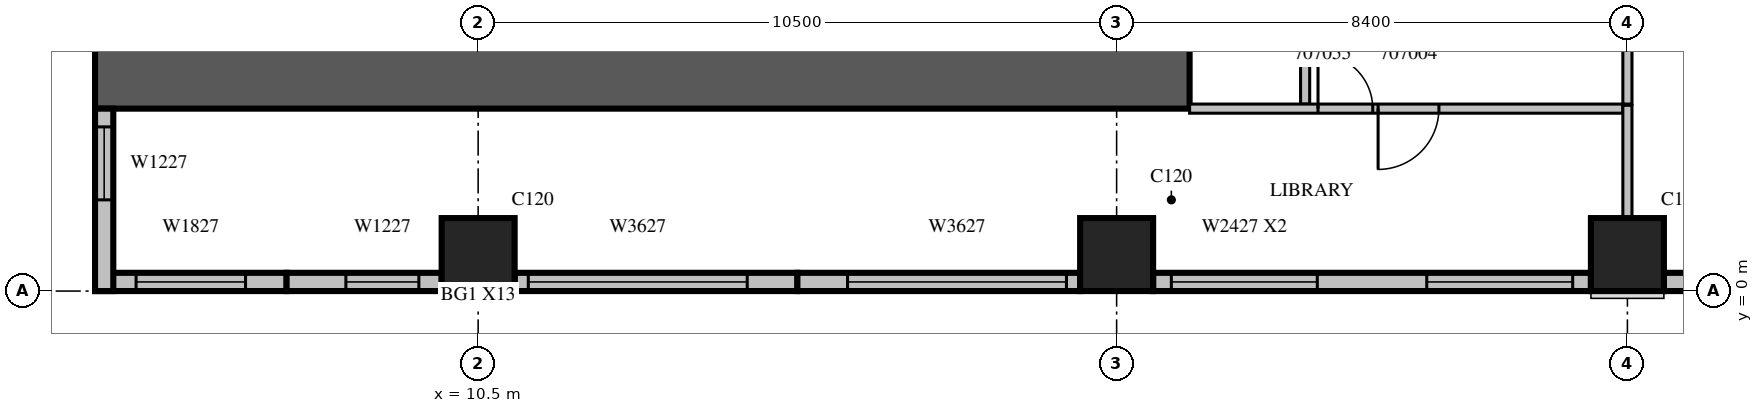
"""IFC4 building model, lengths in metres.
Left out: names, types, materials, properties, quantities, classifications, styles, units other than length and angle.
Written with IfcOpenShell. Run it as: python <this file> out.ifc"""

import sys

from ifc_helpers import new_model, si_unit, direction, frame, frame_2d, origin, origin_2d, place, context, subcontext, project, spatial, rectangle, extrude, source, transform, mapped, element, fill, save


model = new_model("IFC4")
c1 = context("Model", 3, precision=1e-05, world=origin(), true_north=direction((0.0, 1.0)))
c2 = subcontext(c1, "Body", "Model", "MODEL_VIEW")
j1 = project(units=[si_unit("LENGTHUNIT", "METRE"), si_unit("PLANEANGLEUNIT", "RADIAN")], contexts=[c1])
p1 = place(None, origin())
s1 = spatial("IfcSite", under=j1, at=p1, CompositionType="ELEMENT")
p2 = place(p1, origin())
s2 = spatial("IfcBuilding", under=s1, at=p2, CompositionType="ELEMENT")
p3 = place(p2, frame((0.0, 0.0, 40.5)))
s3 = spatial("IfcBuildingStorey", under=s2, at=p3, CompositionType="ELEMENT", Elevation=40.5)
p4 = place(p3, frame((10.5, 0.6, 0.0), z_axis=(0.0, 0.0, 1.0), x_axis=(1.0, 0.0, 0.0)))
e1 = element("IfcColumn", 1, at=p4, inside=s3, PredefinedType="COLUMN", context=c2, shape_type="SweptSolid", body=[
    extrude(rectangle(XDim=1.2, YDim=1.2, at=origin_2d()), origin(), (0.0, 0.0, 1.0), 4.2),
])
m1 = source(origin(), c2, "Body", "SweptSolid", [
    extrude(rectangle(XDim=1.2, YDim=1.2, at=origin_2d()), origin(), (0.0, 0.0, 1.0), 4.2),
])
for number, where, z_axis, x_axis in (
    (2, (21.0, 0.6, 0.0), (0.0, 0.0, 1.0), (1.0, 0.0, 0.0)),
    (3, (29.4, 0.6, 0.0), (0.0, 0.0, 1.0), (1.0, 0.0, 0.0)),
):
    element("IfcColumn", number, at=place(p3, frame(where, z_axis=z_axis, x_axis=x_axis)), inside=s3, PredefinedType="COLUMN", context=c2, shape_type="MappedRepresentation", body=[
        mapped(m1, transform((0.0, 0.0, 0.0), scale=1.0)),
    ])
m2 = source(origin(), c2, "Body", "SweptSolid", [
    extrude(rectangle(XDim=18.0, YDim=1.2, at=frame_2d((9.0, 0.0))), origin(), (0.0, 0.0, 1.0), 4.2),
])
p5 = place(p3, frame((4.2, 3.6, 0.0), z_axis=(0.0, 0.0, 1.0), x_axis=(1.0, 0.0, 0.0)))
e4 = element("IfcWall", 4, at=p5, inside=s3, PredefinedType="SHEAR", context=c2, shape_type="MappedRepresentation", body=[
    mapped(m2, transform((0.0, 0.0, 0.0), scale=1.0)),
])
p6 = place(p3, frame((4.2, 0.15, 0.0), z_axis=(0.0, 0.0, 1.0), x_axis=(1.0, 0.0, 0.0)))
e5 = element("IfcWall", 5, at=p6, inside=s3, PredefinedType="STANDARD", context=c2, shape_type="SweptSolid", body=[
    extrude(rectangle(XDim=3.15, YDim=0.3, at=frame_2d((1.575, 0.0))), origin(), (0.0, 0.0, 1.0), 3.8),
])
p7 = place(p6, frame((0.675, 0.0, 0.6)))
e6 = element("IfcOpeningElement", 6, at=p7, cuts=e5, PredefinedType="OPENING", context=c2, shape_type="SweptSolid", body=[
    extrude(rectangle(XDim=1.8, YDim=2.7, at=frame_2d((0.9, 1.35))), frame((0.0, 0.16, 0.0), z_axis=(0.0, -1.0, 0.0), x_axis=(1.0, 0.0, 0.0)), (0.0, 0.0, 1.0), 0.32),
])
p8 = place(p3, frame((7.35, 0.15, 0.0), z_axis=(0.0, 0.0, 1.0), x_axis=(1.0, 0.0, 0.0)))
e7 = element("IfcWall", 7, at=p8, inside=s3, PredefinedType="STANDARD", context=c2, shape_type="SweptSolid", body=[
    extrude(rectangle(XDim=2.55, YDim=0.3, at=frame_2d((1.275, 0.0))), origin(), (0.0, 0.0, 1.0), 3.8),
])
p9 = place(p8, frame((0.975, 0.0, 0.6)))
e8 = element("IfcOpeningElement", 8, at=p9, cuts=e7, PredefinedType="OPENING", context=c2, shape_type="SweptSolid", body=[
    extrude(rectangle(XDim=1.2, YDim=2.7, at=frame_2d((0.6, 1.35))), frame((0.0, 0.16, 0.0), z_axis=(0.0, -1.0, 0.0), x_axis=(1.0, 0.0, 0.0)), (0.0, 0.0, 1.0), 0.32),
])
p10 = place(p3, frame((11.1, 0.15, 0.0), z_axis=(0.0, 0.0, 1.0), x_axis=(1.0, 0.0, 0.0)))
e9 = element("IfcWall", 9, at=p10, inside=s3, PredefinedType="STANDARD", context=c2, shape_type="SweptSolid", body=[
    extrude(rectangle(XDim=4.65, YDim=0.3, at=frame_2d((2.325, 0.0))), origin(), (0.0, 0.0, 1.0), 3.8),
])
p11 = place(p10, frame((0.225, 0.0, 0.6)))
e10 = element("IfcOpeningElement", 10, at=p11, cuts=e9, PredefinedType="OPENING", context=c2, shape_type="SweptSolid", body=[
    extrude(rectangle(XDim=3.6, YDim=2.7, at=frame_2d((1.8, 1.35))), frame((0.0, 0.16, 0.0), z_axis=(0.0, -1.0, 0.0), x_axis=(1.0, 0.0, 0.0)), (0.0, 0.0, 1.0), 0.32),
])
m3 = source(origin(), c2, "Body", "SweptSolid", [
    extrude(rectangle(XDim=4.65, YDim=0.3, at=frame_2d((2.325, 0.0))), origin(), (0.0, 0.0, 1.0), 3.8),
])
p12 = place(p3, frame((15.75, 0.15, 0.0), z_axis=(0.0, 0.0, 1.0), x_axis=(1.0, 0.0, 0.0)))
e11 = element("IfcWall", 11, at=p12, inside=s3, PredefinedType="STANDARD", context=c2, shape_type="MappedRepresentation", body=[
    mapped(m3, transform((0.0, 0.0, 0.0), scale=1.0)),
])
m4 = source(origin(), c2, "Body", "SweptSolid", [
    extrude(rectangle(XDim=3.6, YDim=2.7, at=frame_2d((1.8, 1.35))), frame((0.0, 0.16, 0.0), z_axis=(0.0, -1.0, 0.0), x_axis=(1.0, 0.0, 0.0)), (0.0, 0.0, 1.0), 0.32),
])
p13 = place(p12, frame((0.825, 0.0, 0.6)))
e12 = element("IfcOpeningElement", 12, at=p13, cuts=e11, PredefinedType="OPENING", context=c2, shape_type="MappedRepresentation", body=[
    mapped(m4, transform((0.0, 0.0, 0.0), scale=1.0)),
])
p14 = place(p3, frame((21.6, 0.15, 0.0), z_axis=(0.0, 0.0, 1.0), x_axis=(1.0, 0.0, 0.0)))
e13 = element("IfcWall", 13, at=p14, inside=s3, PredefinedType="STANDARD", context=c2, shape_type="SweptSolid", body=[
    extrude(rectangle(XDim=7.2, YDim=0.3, at=frame_2d((3.6, 0.0))), origin(), (0.0, 0.0, 1.0), 3.8),
])
p15 = place(p14, frame((0.3, 0.0, 0.6)))
e14 = element("IfcOpeningElement", 14, at=p15, cuts=e13, PredefinedType="OPENING", context=c2, shape_type="SweptSolid", body=[
    extrude(rectangle(XDim=2.4, YDim=2.7, at=frame_2d((1.2, 1.35))), frame((0.0, 0.16, 0.0), z_axis=(0.0, -1.0, 0.0), x_axis=(1.0, 0.0, 0.0)), (0.0, 0.0, 1.0), 0.32),
])
m5 = source(origin(), c2, "Body", "SweptSolid", [
    extrude(rectangle(XDim=2.4, YDim=2.7, at=frame_2d((1.2, 1.35))), frame((0.0, 0.16, 0.0), z_axis=(0.0, -1.0, 0.0), x_axis=(1.0, 0.0, 0.0)), (0.0, 0.0, 1.0), 0.32),
])
p16 = place(p14, frame((4.5, 0.0, 0.6)))
e15 = element("IfcOpeningElement", 15, at=p16, cuts=e13, PredefinedType="OPENING", context=c2, shape_type="MappedRepresentation", body=[
    mapped(m5, transform((0.0, 0.0, 0.0), scale=1.0)),
])
m6 = source(origin(), c2, "Body", "SweptSolid", [
    extrude(rectangle(XDim=7.2, YDim=0.3, at=frame_2d((3.6, 0.0))), origin(), (0.0, 0.0, 1.0), 3.8),
])
p17 = place(p3, frame((30.0, 0.15, 0.0), z_axis=(0.0, 0.0, 1.0), x_axis=(1.0, 0.0, 0.0)))
e16 = element("IfcWall", 16, at=p17, inside=s3, PredefinedType="STANDARD", context=c2, shape_type="MappedRepresentation", body=[
    mapped(m6, transform((0.0, 0.0, 0.0), scale=1.0)),
])
m7 = source(origin(), c2, "Body", "SweptSolid", [
    extrude(rectangle(XDim=3.0, YDim=0.3, at=frame_2d((1.5, 0.0))), origin(), (0.0, 0.0, 1.0), 3.8),
])
p18 = place(p3, frame((4.35, 3.0, 0.0), z_axis=(0.0, 0.0, 1.0), x_axis=(0.0, -1.0, 0.0)))
e17 = element("IfcWall", 17, at=p18, inside=s3, PredefinedType="STANDARD", context=c2, shape_type="MappedRepresentation", body=[
    mapped(m7, transform((0.0, 0.0, 0.0), scale=1.0)),
])
m8 = source(origin(), c2, "Body", "SweptSolid", [
    extrude(rectangle(XDim=1.2, YDim=2.7, at=frame_2d((0.6, 1.35))), frame((0.0, 0.16, 0.0), z_axis=(0.0, -1.0, 0.0), x_axis=(1.0, 0.0, 0.0)), (0.0, 0.0, 1.0), 0.32),
])
p19 = place(p18, frame((0.3, 0.0, 0.6)))
e18 = element("IfcOpeningElement", 18, at=p19, cuts=e17, PredefinedType="OPENING", context=c2, shape_type="MappedRepresentation", body=[
    mapped(m8, transform((0.0, 0.0, 0.0), scale=1.0)),
])
p20 = place(p3, frame((24.1, 15.0, 0.0), z_axis=(0.0, 0.0, 1.0), x_axis=(0.0, -1.0, 0.0)))
e19 = element("IfcWall", 19, at=p20, inside=s3, PredefinedType="PARTITIONING", context=c2, shape_type="SweptSolid", body=[
    extrude(rectangle(XDim=11.925, YDim=0.15, at=frame_2d((5.963, 0.0))), origin(), (0.0, 0.0, 1.0), 3.8),
])
p21 = place(p20, frame((9.562, 0.0, 0.0)))
e20 = element("IfcOpeningElement", 20, at=p21, cuts=e19, PredefinedType="OPENING", context=c2, shape_type="SweptSolid", body=[
    extrude(rectangle(XDim=0.9, YDim=2.1, at=frame_2d((0.45, 1.05))), frame((0.0, 0.085, 0.0), z_axis=(0.0, -1.0, 0.0), x_axis=(1.0, 0.0, 0.0)), (0.0, 0.0, 1.0), 0.17),
])
m9 = source(origin(), c2, "Body", "SweptSolid", [
    extrude(rectangle(XDim=0.9, YDim=2.1, at=frame_2d((0.45, 1.05))), frame((0.0, 0.085, 0.0), z_axis=(0.0, -1.0, 0.0), x_axis=(1.0, 0.0, 0.0)), (0.0, 0.0, 1.0), 0.17),
])
p22 = place(p20, frame((2.725, 0.0, 0.0)))
e21 = element("IfcOpeningElement", 21, at=p22, cuts=e19, PredefinedType="OPENING", context=c2, shape_type="MappedRepresentation", body=[
    mapped(m9, transform((0.0, 0.0, 0.0), scale=1.0)),
])
p23 = place(p3, frame((29.4, 3.075, 0.0), z_axis=(0.0, 0.0, 1.0), x_axis=(0.0, 1.0, 0.0)))
e22 = element("IfcWall", 22, at=p23, inside=s3, PredefinedType="PARTITIONING", context=c2, shape_type="SweptSolid", body=[
    extrude(rectangle(XDim=6.826, YDim=0.15, at=frame_2d((3.413, 0.0))), origin(), (0.0, 0.0, 1.0), 3.8),
])
p24 = place(p3, frame((22.2, 3.0, 0.0), z_axis=(0.0, 0.0, 1.0), x_axis=(1.0, 0.0, 0.0)))
e23 = element("IfcWall", 23, at=p24, inside=s3, PredefinedType="PARTITIONING", context=c2, shape_type="SweptSolid", body=[
    extrude(rectangle(XDim=7.125, YDim=0.15, at=frame_2d((3.562, 0.0))), origin(), (0.0, 0.0, 1.0), 3.8),
])
p25 = place(p24, frame((3.1, 0.0, 0.0)))
e24 = element("IfcOpeningElement", 24, at=p25, cuts=e23, PredefinedType="OPENING", context=c2, shape_type="SweptSolid", body=[
    extrude(rectangle(XDim=1.0, YDim=2.1, at=frame_2d((0.5, 1.05))), frame((0.0, 0.085, 0.0), z_axis=(0.0, -1.0, 0.0), x_axis=(1.0, 0.0, 0.0)), (0.0, 0.0, 1.0), 0.17),
])
p26 = place(p24, frame((2.112, 0.0, 0.0)))
e25 = element("IfcOpeningElement", 25, at=p26, cuts=e23, PredefinedType="OPENING", context=c2, shape_type="MappedRepresentation", body=[
    mapped(m9, transform((0.0, 0.0, 0.0), scale=1.0)),
])
p27 = place(p3, frame((29.4, 1.199, 0.0), z_axis=(0.0, 0.0, 1.0), x_axis=(0.0, 1.0, 0.0)))
e26 = element("IfcWall", 26, at=p27, inside=s3, PredefinedType="PARTITIONING", context=c2, shape_type="SweptSolid", body=[
    extrude(rectangle(XDim=1.856, YDim=0.15, at=frame_2d((0.928, 0.0))), origin(), (0.0, 0.0, 1.0), 3.8),
])
p28 = place(p7, origin())
e27 = element("IfcWindow", 27, at=p28, inside=s3, PartitioningType="SINGLE_PANEL", PredefinedType="WINDOW", context=c2, shape_type="SweptSolid", body=[
    extrude(rectangle(XDim=1.8, YDim=2.7, at=frame_2d((0.9, 1.35))), frame((0.0, 0.03, 0.0), z_axis=(0.0, -1.0, 0.0), x_axis=(1.0, 0.0, 0.0)), (0.0, 0.0, 1.0), 0.06),
])
fill(e6, e27)
p29 = place(p9, origin())
e28 = element("IfcWindow", 28, at=p29, inside=s3, PartitioningType="SINGLE_PANEL", PredefinedType="WINDOW", context=c2, shape_type="SweptSolid", body=[
    extrude(rectangle(XDim=1.2, YDim=2.7, at=frame_2d((0.6, 1.35))), frame((0.0, 0.03, 0.0), z_axis=(0.0, -1.0, 0.0), x_axis=(1.0, 0.0, 0.0)), (0.0, 0.0, 1.0), 0.06),
])
fill(e8, e28)
p30 = place(p11, origin())
e29 = element("IfcWindow", 29, at=p30, inside=s3, PartitioningType="SINGLE_PANEL", PredefinedType="WINDOW", context=c2, shape_type="SweptSolid", body=[
    extrude(rectangle(XDim=3.6, YDim=2.7, at=frame_2d((1.8, 1.35))), frame((0.0, 0.03, 0.0), z_axis=(0.0, -1.0, 0.0), x_axis=(1.0, 0.0, 0.0)), (0.0, 0.0, 1.0), 0.06),
])
fill(e10, e29)
m10 = source(origin(), c2, "Body", "SweptSolid", [
    extrude(rectangle(XDim=3.6, YDim=2.7, at=frame_2d((1.8, 1.35))), frame((0.0, 0.03, 0.0), z_axis=(0.0, -1.0, 0.0), x_axis=(1.0, 0.0, 0.0)), (0.0, 0.0, 1.0), 0.06),
])
p31 = place(p13, origin())
e30 = element("IfcWindow", 30, at=p31, inside=s3, PartitioningType="SINGLE_PANEL", PredefinedType="WINDOW", context=c2, shape_type="MappedRepresentation", body=[
    mapped(m10, transform((0.0, 0.0, 0.0), scale=1.0)),
])
fill(e12, e30)
p32 = place(p15, origin())
e31 = element("IfcWindow", 31, at=p32, inside=s3, PartitioningType="SINGLE_PANEL", PredefinedType="WINDOW", context=c2, shape_type="SweptSolid", body=[
    extrude(rectangle(XDim=2.4, YDim=2.7, at=frame_2d((1.2, 1.35))), frame((0.0, 0.03, 0.0), z_axis=(0.0, -1.0, 0.0), x_axis=(1.0, 0.0, 0.0)), (0.0, 0.0, 1.0), 0.06),
])
fill(e14, e31)
m11 = source(origin(), c2, "Body", "SweptSolid", [
    extrude(rectangle(XDim=2.4, YDim=2.7, at=frame_2d((1.2, 1.35))), frame((0.0, 0.03, 0.0), z_axis=(0.0, -1.0, 0.0), x_axis=(1.0, 0.0, 0.0)), (0.0, 0.0, 1.0), 0.06),
])
p33 = place(p16, origin())
e32 = element("IfcWindow", 32, at=p33, inside=s3, PartitioningType="SINGLE_PANEL", PredefinedType="WINDOW", context=c2, shape_type="MappedRepresentation", body=[
    mapped(m11, transform((0.0, 0.0, 0.0), scale=1.0)),
])
fill(e15, e32)
m12 = source(origin(), c2, "Body", "SweptSolid", [
    extrude(rectangle(XDim=1.2, YDim=2.7, at=frame_2d((0.6, 1.35))), frame((0.0, 0.03, 0.0), z_axis=(0.0, -1.0, 0.0), x_axis=(1.0, 0.0, 0.0)), (0.0, 0.0, 1.0), 0.06),
])
p34 = place(p19, origin())
e33 = element("IfcWindow", 33, at=p34, inside=s3, PartitioningType="SINGLE_PANEL", PredefinedType="WINDOW", context=c2, shape_type="MappedRepresentation", body=[
    mapped(m12, transform((0.0, 0.0, 0.0), scale=1.0)),
])
fill(e18, e33)
m13 = source(origin(), c2, "Body", "SweptSolid", [
    extrude(rectangle(XDim=1.0, YDim=2.1, at=frame_2d((0.5, 1.05))), frame((0.0, 0.025, 0.0), z_axis=(0.0, -1.0, 0.0), x_axis=(1.0, 0.0, 0.0)), (0.0, 0.0, 1.0), 0.05),
])
p35 = place(p25, origin())
e34 = element("IfcDoor", 34, at=p35, inside=s3, OperationType="SINGLE_SWING_RIGHT", PredefinedType="DOOR", context=c2, shape_type="MappedRepresentation", body=[
    mapped(m13, transform((0.0, 0.0, 0.0), scale=1.0)),
])
fill(e24, e34)
m14 = source(origin(), c2, "Body", "SweptSolid", [
    extrude(rectangle(XDim=0.9, YDim=2.1, at=frame_2d((0.45, 1.05))), frame((0.0, 0.025, 0.0), z_axis=(0.0, -1.0, 0.0), x_axis=(1.0, 0.0, 0.0)), (0.0, 0.0, 1.0), 0.05),
])
p36 = place(p26, origin())
e35 = element("IfcDoor", 35, at=p36, inside=s3, OperationType="SINGLE_SWING_LEFT", PredefinedType="DOOR", context=c2, shape_type="MappedRepresentation", body=[
    mapped(m14, transform((0.0, 0.0, 0.0), scale=1.0)),
])
fill(e25, e35)
save(model, sys.argv[1])
